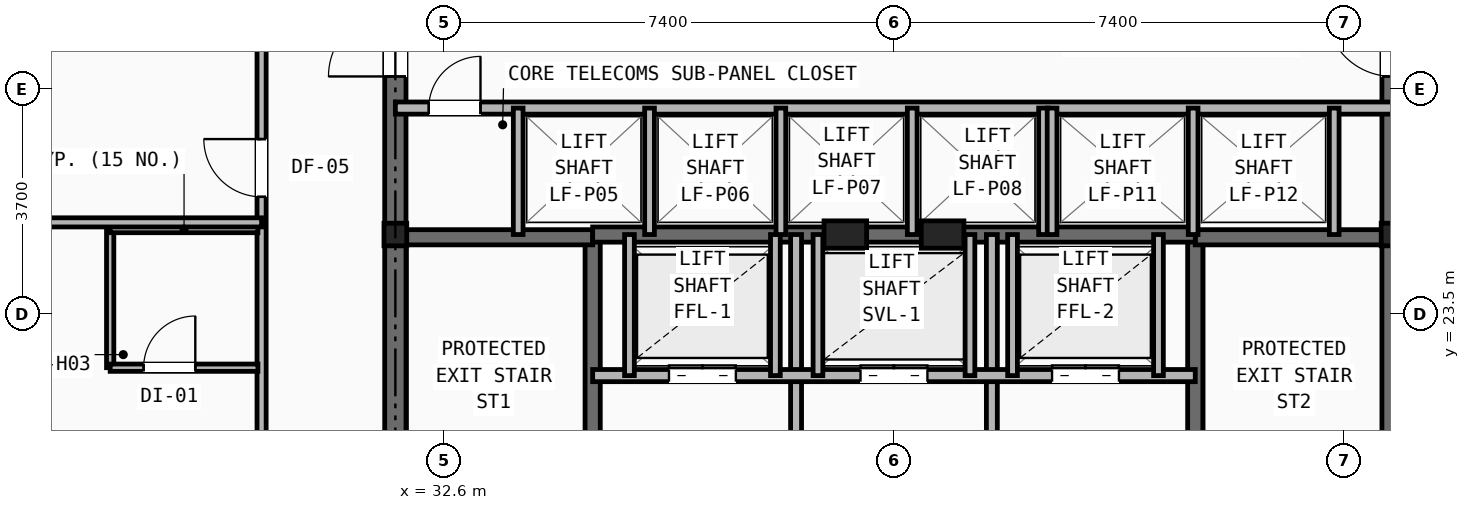
"""IFC4 building model, lengths in metres.
Left out: names, types, materials, properties, quantities, classifications, styles, units other than length and angle.
Written with IfcOpenShell. Run it as: python <this file> out.ifc"""

import sys

from ifc_helpers import new_model, si_unit, direction, frame, frame_2d, origin, origin_2d, place, context, subcontext, project, spatial, rectangle, i_section, extrude, element, fill, save


model = new_model("IFC4")
c1 = context("Model", 3, precision=1e-05, world=origin(), true_north=direction((0.0, 1.0)))
c2 = subcontext(c1, "Body", "Model", "MODEL_VIEW")
j1 = project(units=[si_unit("LENGTHUNIT", "METRE"), si_unit("PLANEANGLEUNIT", "RADIAN")], contexts=[c1])
p1 = place(None, origin())
s1 = spatial("IfcSite", under=j1, at=p1, CompositionType="ELEMENT")
p2 = place(p1, origin())
s2 = spatial("IfcBuilding", under=s1, at=p2, CompositionType="ELEMENT")
p3 = place(p2, frame((0.0, 0.0, 40.0)))
s3 = spatial("IfcBuildingStorey", under=s2, at=p3, CompositionType="ELEMENT", Elevation=40.0)
for number, where, z_axis, x_axis in (
    (1, (31.8, 24.8, 0.0), (0.0, 0.0, 1.0), (1.0, 0.0, 0.0)),
    (2, (48.2, 24.8, 0.0), (0.0, 0.0, 1.0), (1.0, 0.0, 0.0)),
):
    element("IfcColumn", number, at=place(p3, frame(where, z_axis=z_axis, x_axis=x_axis)), inside=s3, PredefinedType="COLUMN", context=c2, shape_type="SweptSolid", body=[
        extrude(i_section(OverallWidth=0.374, OverallDepth=0.372, WebThickness=0.016, FlangeThickness=0.026, at=origin_2d()), origin(), (0.0, 0.0, 1.0), 3.2),
    ])
for number, where, z_axis, x_axis in (
    (3, (39.2, 24.8, 0.0), (0.0, 0.0, 1.0), (1.0, 0.0, 0.0)),
    (4, (40.8, 24.8, 0.0), (0.0, 0.0, 1.0), (1.0, 0.0, 0.0)),
):
    element("IfcColumn", number, at=place(p3, frame(where, z_axis=z_axis, x_axis=x_axis)), inside=s3, PredefinedType="PILASTER", context=c2, shape_type="SweptSolid", body=[
        extrude(rectangle(XDim=0.7, YDim=0.45, at=origin_2d()), origin(), (0.0, 0.0, 1.0), 3.2),
    ])
p4 = place(p3, frame((31.8, 16.4, 0.0), z_axis=(0.0, 0.0, 1.0), x_axis=(0.0, 1.0, 0.0)))
e5 = element("IfcWall", 5, at=p4, inside=s3, PredefinedType="SHEAR", context=c2, shape_type="SweptSolid", body=[
    extrude(rectangle(XDim=14.8, YDim=0.35, at=frame_2d((7.4, 0.0))), origin(), (0.0, 0.0, 1.0), 2.98),
])
p5 = place(p4, frame((11.0, 0.0, 0.0)))
e6 = element("IfcOpeningElement", 6, at=p5, cuts=e5, PredefinedType="OPENING", context=c2, shape_type="SweptSolid", body=[
    extrude(rectangle(XDim=1.1, YDim=2.15, at=frame_2d((0.55, 1.075))), frame((0.0, 0.185, 0.0), z_axis=(0.0, -1.0, 0.0), x_axis=(1.0, 0.0, 0.0)), (0.0, 0.0, 1.0), 0.37),
])
p6 = place(p3, frame((48.2, 16.4, 0.0), z_axis=(0.0, 0.0, 1.0), x_axis=(0.0, 1.0, 0.0)))
e7 = element("IfcWall", 7, at=p6, inside=s3, PredefinedType="SHEAR", context=c2, shape_type="SweptSolid", body=[
    extrude(rectangle(XDim=14.8, YDim=0.35, at=frame_2d((7.4, 0.0))), origin(), (0.0, 0.0, 1.0), 2.98),
])
p7 = place(p6, frame((11.0, 0.0, 0.0)))
e8 = element("IfcOpeningElement", 8, at=p7, cuts=e7, PredefinedType="OPENING", context=c2, shape_type="SweptSolid", body=[
    extrude(rectangle(XDim=1.1, YDim=2.15, at=frame_2d((0.55, 1.075))), frame((0.0, 0.185, 0.0), z_axis=(0.0, -1.0, 0.0), x_axis=(1.0, 0.0, 0.0)), (0.0, 0.0, 1.0), 0.37),
])
p8 = place(p3, frame((35.045, 16.4, 0.0), z_axis=(0.0, 0.0, 1.0), x_axis=(0.0, 1.0, 0.0)))
e9 = element("IfcWall", 9, at=p8, inside=s3, PredefinedType="SHEAR", context=c2, shape_type="SweptSolid", body=[
    extrude(rectangle(XDim=8.4, YDim=0.25, at=frame_2d((4.2, 0.0))), origin(), (0.0, 0.0, 1.0), 2.98),
])
p9 = place(p8, frame((0.45, 0.0, 0.0)))
e10 = element("IfcOpeningElement", 10, at=p9, cuts=e9, PredefinedType="OPENING", context=c2, shape_type="SweptSolid", body=[
    extrude(rectangle(XDim=0.95, YDim=2.1, at=frame_2d((0.475, 1.05))), frame((0.0, 0.135, 0.0), z_axis=(0.0, -1.0, 0.0), x_axis=(1.0, 0.0, 0.0)), (0.0, 0.0, 1.0), 0.27),
])
p10 = place(p3, frame((31.8, 24.755, 0.0), z_axis=(0.0, 0.0, 1.0), x_axis=(1.0, 0.0, 0.0)))
e11 = element("IfcWall", 11, at=p10, inside=s3, PredefinedType="SHEAR", context=c2, shape_type="SweptSolid", body=[
    extrude(rectangle(XDim=3.245, YDim=0.25, at=frame_2d((1.623, 0.0))), origin(), (0.0, 0.0, 1.0), 2.98),
])
p11 = place(p3, frame((44.955, 16.4, 0.0), z_axis=(0.0, 0.0, 1.0), x_axis=(0.0, 1.0, 0.0)))
e12 = element("IfcWall", 12, at=p11, inside=s3, PredefinedType="SHEAR", context=c2, shape_type="SweptSolid", body=[
    extrude(rectangle(XDim=8.4, YDim=0.25, at=frame_2d((4.2, 0.0))), origin(), (0.0, 0.0, 1.0), 2.98),
])
p12 = place(p11, frame((0.45, 0.0, 0.0)))
e13 = element("IfcOpeningElement", 13, at=p12, cuts=e12, PredefinedType="OPENING", context=c2, shape_type="SweptSolid", body=[
    extrude(rectangle(XDim=0.95, YDim=2.1, at=frame_2d((0.475, 1.05))), frame((0.0, 0.135, 0.0), z_axis=(0.0, -1.0, 0.0), x_axis=(1.0, 0.0, 0.0)), (0.0, 0.0, 1.0), 0.27),
])
p13 = place(p3, frame((44.955, 24.755, 0.0), z_axis=(0.0, 0.0, 1.0), x_axis=(1.0, 0.0, 0.0)))
e14 = element("IfcWall", 14, at=p13, inside=s3, PredefinedType="SHEAR", context=c2, shape_type="SweptSolid", body=[
    extrude(rectangle(XDim=3.245, YDim=0.25, at=frame_2d((1.623, 0.0))), origin(), (0.0, 0.0, 1.0), 2.98),
])
p14 = place(p3, frame((35.045, 24.8, 0.0), z_axis=(0.0, 0.0, 1.0), x_axis=(1.0, 0.0, 0.0)))
e15 = element("IfcWall", 15, at=p14, inside=s3, PredefinedType="SHEAR", context=c2, shape_type="SweptSolid", body=[
    extrude(rectangle(XDim=9.91, YDim=0.25, at=frame_2d((4.955, 0.0))), origin(), (0.0, 0.0, 1.0), 2.98),
])
p15 = place(p3, frame((38.39, 16.4, 0.0), z_axis=(0.0, 0.0, 1.0), x_axis=(0.0, 1.0, 0.0)))
e16 = element("IfcWall", 16, at=p15, inside=s3, PredefinedType="PARTITIONING", context=c2, shape_type="SweptSolid", body=[
    extrude(rectangle(XDim=8.4, YDim=0.18, at=frame_2d((4.2, 0.0))), origin(), (0.0, 0.0, 1.0), 2.708),
])
p16 = place(p15, frame((3.85, 0.0, 0.0)))
e17 = element("IfcOpeningElement", 17, at=p16, cuts=e16, PredefinedType="OPENING", context=c2, shape_type="SweptSolid", body=[
    extrude(rectangle(XDim=0.95, YDim=2.1, at=frame_2d((0.475, 1.05))), frame((0.0, 0.1, 0.0), z_axis=(0.0, -1.0, 0.0), x_axis=(1.0, 0.0, 0.0)), (0.0, 0.0, 1.0), 0.2),
])
p17 = place(p3, frame((41.61, 16.4, 0.0), z_axis=(0.0, 0.0, 1.0), x_axis=(0.0, 1.0, 0.0)))
e18 = element("IfcWall", 18, at=p17, inside=s3, PredefinedType="PARTITIONING", context=c2, shape_type="SweptSolid", body=[
    extrude(rectangle(XDim=8.4, YDim=0.18, at=frame_2d((4.2, 0.0))), origin(), (0.0, 0.0, 1.0), 2.708),
])
p18 = place(p3, frame((35.045, 22.48, 0.0), z_axis=(0.0, 0.0, 1.0), x_axis=(1.0, 0.0, 0.0)))
e19 = element("IfcWall", 19, at=p18, inside=s3, PredefinedType="SOLIDWALL", context=c2, shape_type="SweptSolid", body=[
    extrude(rectangle(XDim=9.91, YDim=0.2, at=frame_2d((4.955, 0.0))), origin(), (0.0, 0.0, 1.0), 2.98),
])
p19 = place(p18, frame((1.255, 0.0, 0.0)))
e20 = element("IfcOpeningElement", 20, at=p19, cuts=e19, PredefinedType="OPENING", context=c2, shape_type="SweptSolid", body=[
    extrude(rectangle(XDim=1.1, YDim=2.15, at=frame_2d((0.55, 1.075))), frame((0.0, 0.11, 0.0), z_axis=(0.0, -1.0, 0.0), x_axis=(1.0, 0.0, 0.0)), (0.0, 0.0, 1.0), 0.22),
])
p20 = place(p18, frame((7.555, 0.0, 0.0)))
e21 = element("IfcOpeningElement", 21, at=p20, cuts=e19, PredefinedType="OPENING", context=c2, shape_type="SweptSolid", body=[
    extrude(rectangle(XDim=1.1, YDim=2.15, at=frame_2d((0.55, 1.075))), frame((0.0, 0.11, 0.0), z_axis=(0.0, -1.0, 0.0), x_axis=(1.0, 0.0, 0.0)), (0.0, 0.0, 1.0), 0.22),
])
p21 = place(p18, frame((4.405, 0.0, 0.0)))
e22 = element("IfcOpeningElement", 22, at=p21, cuts=e19, PredefinedType="OPENING", context=c2, shape_type="SweptSolid", body=[
    extrude(rectangle(XDim=1.1, YDim=2.15, at=frame_2d((0.55, 1.075))), frame((0.0, 0.11, 0.0), z_axis=(0.0, -1.0, 0.0), x_axis=(1.0, 0.0, 0.0)), (0.0, 0.0, 1.0), 0.22),
])
for number, where, z_axis, x_axis in (
    (23, (35.65, 22.48, 0.0), (0.0, 0.0, 1.0), (0.0, 1.0, 0.0)),
    (24, (38.05, 22.48, 0.0), (0.0, 0.0, 1.0), (0.0, 1.0, 0.0)),
    (25, (41.95, 22.48, 0.0), (0.0, 0.0, 1.0), (0.0, 1.0, 0.0)),
    (26, (44.35, 22.48, 0.0), (0.0, 0.0, 1.0), (0.0, 1.0, 0.0)),
    (27, (38.75, 22.48, 0.0), (0.0, 0.0, 1.0), (0.0, 1.0, 0.0)),
    (28, (41.25, 22.48, 0.0), (0.0, 0.0, 1.0), (0.0, 1.0, 0.0)),
):
    element("IfcWall", number, at=place(p3, frame(where, z_axis=z_axis, x_axis=x_axis)), inside=s3, PredefinedType="SOLIDWALL", context=c2, shape_type="SweptSolid", body=[
        extrude(rectangle(XDim=2.32, YDim=0.16, at=frame_2d((1.16, 0.0))), origin(), (0.0, 0.0, 1.0), 2.98),
    ])
p22 = place(p3, frame((31.8, 26.88, 0.0), z_axis=(0.0, 0.0, 1.0), x_axis=(1.0, 0.0, 0.0)))
e29 = element("IfcWall", 29, at=p22, inside=s3, PredefinedType="SOLIDWALL", context=c2, shape_type="SweptSolid", body=[
    extrude(rectangle(XDim=16.4, YDim=0.2, at=frame_2d((8.2, 0.0))), origin(), (0.0, 0.0, 1.0), 2.431),
])
p23 = place(p22, frame((0.55, 0.0, 0.0)))
e30 = element("IfcOpeningElement", 30, at=p23, cuts=e29, PredefinedType="OPENING", context=c2, shape_type="SweptSolid", body=[
    extrude(rectangle(XDim=0.85, YDim=2.05, at=frame_2d((0.425, 1.025))), frame((0.0, 0.11, 0.0), z_axis=(0.0, -1.0, 0.0), x_axis=(1.0, 0.0, 0.0)), (0.0, 0.0, 1.0), 0.22),
])
for number, where, z_axis, x_axis in (
    (31, (33.82, 24.8, 0.0), (0.0, 0.0, 1.0), (0.0, 1.0, 0.0)),
    (32, (35.98, 24.8, 0.0), (0.0, 0.0, 1.0), (0.0, 1.0, 0.0)),
    (33, (38.14, 24.8, 0.0), (0.0, 0.0, 1.0), (0.0, 1.0, 0.0)),
    (34, (40.3, 24.8, 0.0), (0.0, 0.0, 1.0), (0.0, 1.0, 0.0)),
    (35, (42.46, 24.8, 0.0), (0.0, 0.0, 1.0), (0.0, 1.0, 0.0)),
    (36, (42.6, 24.8, 0.0), (0.0, 0.0, 1.0), (0.0, 1.0, 0.0)),
    (37, (44.92, 24.8, 0.0), (0.0, 0.0, 1.0), (0.0, 1.0, 0.0)),
    (38, (47.24, 24.8, 0.0), (0.0, 0.0, 1.0), (0.0, 1.0, 0.0)),
):
    element("IfcWall", number, at=place(p3, frame(where, z_axis=z_axis, x_axis=x_axis)), inside=s3, PredefinedType="SOLIDWALL", context=c2, shape_type="SweptSolid", body=[
        extrude(rectangle(XDim=2.08, YDim=0.16, at=frame_2d((1.04, 0.0))), origin(), (0.0, 0.0, 1.0), 2.98),
    ])
p24 = place(p3, frame((29.6, 14.1, 0.0), z_axis=(0.0, 0.0, 1.0), x_axis=(0.0, 1.0, 0.0)))
e39 = element("IfcWall", 39, at=p24, inside=s3, PredefinedType="PARTITIONING", context=c2, shape_type="SweptSolid", body=[
    extrude(rectangle(XDim=21.9, YDim=0.15, at=frame_2d((10.95, 0.0))), origin(), (0.0, 0.0, 1.0), 2.431),
])
p25 = place(p24, frame((0.42, 0.0, 0.0)))
e40 = element("IfcOpeningElement", 40, at=p25, cuts=e39, PredefinedType="OPENING", context=c2, shape_type="SweptSolid", body=[
    extrude(rectangle(XDim=0.95, YDim=2.1, at=frame_2d((0.475, 1.05))), frame((0.0, 0.085, 0.0), z_axis=(0.0, -1.0, 0.0), x_axis=(1.0, 0.0, 0.0)), (0.0, 0.0, 1.0), 0.17),
])
p26 = place(p24, frame((11.32, 0.0, 0.0)))
e41 = element("IfcOpeningElement", 41, at=p26, cuts=e39, PredefinedType="OPENING", context=c2, shape_type="SweptSolid", body=[
    extrude(rectangle(XDim=0.95, YDim=2.1, at=frame_2d((0.475, 1.05))), frame((0.0, 0.085, 0.0), z_axis=(0.0, -1.0, 0.0), x_axis=(1.0, 0.0, 0.0)), (0.0, 0.0, 1.0), 0.17),
])
p27 = place(p3, frame((27.11, 22.61, 0.0), z_axis=(0.0, 0.0, 1.0), x_axis=(0.0, 1.0, 0.0)))
e42 = element("IfcWall", 42, at=p27, inside=s3, PredefinedType="PARTITIONING", context=c2, shape_type="SweptSolid", body=[
    extrude(rectangle(XDim=2.28, YDim=0.12, at=frame_2d((1.14, 0.0))), origin(), (0.0, 0.0, 1.0), 2.98),
])
p28 = place(p3, frame((27.11, 22.61, 0.0), z_axis=(0.0, 0.0, 1.0), x_axis=(1.0, 0.0, 0.0)))
e43 = element("IfcWall", 43, at=p28, inside=s3, PredefinedType="PARTITIONING", context=c2, shape_type="SweptSolid", body=[
    extrude(rectangle(XDim=2.43, YDim=0.12, at=frame_2d((1.215, 0.0))), origin(), (0.0, 0.0, 1.0), 2.98),
])
p29 = place(p28, frame((0.55, 0.0, 0.0)))
e44 = element("IfcOpeningElement", 44, at=p29, cuts=e43, PredefinedType="OPENING", context=c2, shape_type="SweptSolid", body=[
    extrude(rectangle(XDim=0.85, YDim=2.05, at=frame_2d((0.425, 1.025))), frame((0.0, 0.07, 0.0), z_axis=(0.0, -1.0, 0.0), x_axis=(1.0, 0.0, 0.0)), (0.0, 0.0, 1.0), 0.14),
])
p30 = place(p3, frame((27.11, 24.89, 0.0), z_axis=(0.0, 0.0, 1.0), x_axis=(1.0, 0.0, 0.0)))
e45 = element("IfcWall", 45, at=p30, inside=s3, PredefinedType="PARTITIONING", context=c2, shape_type="SweptSolid", body=[
    extrude(rectangle(XDim=2.43, YDim=0.12, at=frame_2d((1.215, 0.0))), origin(), (0.0, 0.0, 1.0), 2.98),
])
p31 = place(p3, frame((16.825, 25.0, 0.0), z_axis=(0.0, 0.0, 1.0), x_axis=(1.0, 0.0, 0.0)))
e46 = element("IfcWall", 46, at=p31, inside=s3, PredefinedType="PARTITIONING", context=c2, shape_type="SweptSolid", body=[
    extrude(rectangle(XDim=12.775, YDim=0.15, at=frame_2d((6.387, 0.0))), origin(), (0.0, 0.0, 1.0), 2.268),
])
p32 = place(p19, origin())
e47 = element("IfcDoor", 47, at=p32, inside=s3, OperationType="DOUBLE_DOOR_SLIDING", PredefinedType="DOOR", context=c2, shape_type="SweptSolid", body=[
    extrude(rectangle(XDim=1.1, YDim=2.15, at=frame_2d((0.55, 1.075))), frame((0.0, 0.025, 0.0), z_axis=(0.0, -1.0, 0.0), x_axis=(1.0, 0.0, 0.0)), (0.0, 0.0, 1.0), 0.05),
])
fill(e20, e47)
p33 = place(p20, origin())
e48 = element("IfcDoor", 48, at=p33, inside=s3, OperationType="DOUBLE_DOOR_SLIDING", PredefinedType="DOOR", context=c2, shape_type="SweptSolid", body=[
    extrude(rectangle(XDim=1.1, YDim=2.15, at=frame_2d((0.55, 1.075))), frame((0.0, 0.025, 0.0), z_axis=(0.0, -1.0, 0.0), x_axis=(1.0, 0.0, 0.0)), (0.0, 0.0, 1.0), 0.05),
])
fill(e21, e48)
p34 = place(p21, origin())
e49 = element("IfcDoor", 49, at=p34, inside=s3, OperationType="DOUBLE_DOOR_SLIDING", PredefinedType="DOOR", context=c2, shape_type="SweptSolid", body=[
    extrude(rectangle(XDim=1.1, YDim=2.15, at=frame_2d((0.55, 1.075))), frame((0.0, 0.025, 0.0), z_axis=(0.0, -1.0, 0.0), x_axis=(1.0, 0.0, 0.0)), (0.0, 0.0, 1.0), 0.05),
])
fill(e22, e49)
p35 = place(p23, origin())
e50 = element("IfcDoor", 50, at=p35, inside=s3, OperationType="SINGLE_SWING_RIGHT", PredefinedType="DOOR", context=c2, shape_type="SweptSolid", body=[
    extrude(rectangle(XDim=0.85, YDim=2.05, at=frame_2d((0.425, 1.025))), frame((0.0, 0.025, 0.0), z_axis=(0.0, -1.0, 0.0), x_axis=(1.0, 0.0, 0.0)), (0.0, 0.0, 1.0), 0.05),
])
fill(e30, e50)
p36 = place(p5, origin())
e51 = element("IfcDoor", 51, at=p36, inside=s3, OperationType="SINGLE_SWING_LEFT", PredefinedType="DOOR", context=c2, shape_type="SweptSolid", body=[
    extrude(rectangle(XDim=1.1, YDim=2.15, at=frame_2d((0.55, 1.075))), frame((0.0, 0.025, 0.0), z_axis=(0.0, -1.0, 0.0), x_axis=(1.0, 0.0, 0.0)), (0.0, 0.0, 1.0), 0.05),
])
fill(e6, e51)
p37 = place(p29, origin())
e52 = element("IfcDoor", 52, at=p37, inside=s3, OperationType="SINGLE_SWING_RIGHT", PredefinedType="DOOR", context=c2, shape_type="SweptSolid", body=[
    extrude(rectangle(XDim=0.85, YDim=2.05, at=frame_2d((0.425, 1.025))), frame((0.0, 0.025, 0.0), z_axis=(0.0, -1.0, 0.0), x_axis=(1.0, 0.0, 0.0)), (0.0, 0.0, 1.0), 0.05),
])
fill(e44, e52)
p38 = place(p26, origin())
e53 = element("IfcDoor", 53, at=p38, inside=s3, OperationType="SINGLE_SWING_RIGHT", PredefinedType="DOOR", context=c2, shape_type="SweptSolid", body=[
    extrude(rectangle(XDim=0.95, YDim=2.1, at=frame_2d((0.475, 1.05))), frame((0.0, 0.025, 0.0), z_axis=(0.0, -1.0, 0.0), x_axis=(1.0, 0.0, 0.0)), (0.0, 0.0, 1.0), 0.05),
])
fill(e41, e53)
save(model, sys.argv[1])
